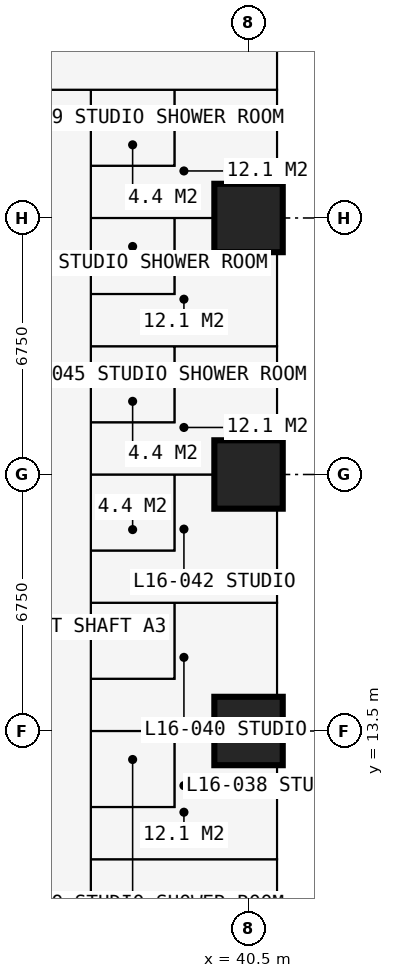
"""IFC4 building model, lengths in metres.
Left out: names, types, materials, properties, quantities, classifications, styles, units other than length and angle.
Written with IfcOpenShell. Run it as: python <this file> out.ifc"""

import sys

from ifc_helpers import new_model, si_unit, direction, frame, frame_2d, origin, origin_2d, place, context, subcontext, project, spatial, rectangle, extrude, element, fill, save


model = new_model("IFC4")
c1 = context("Model", 3, precision=1e-05, world=origin(), true_north=direction((0.0, 1.0)))
c2 = subcontext(c1, "Body", "Model", "MODEL_VIEW")
j1 = project(units=[si_unit("LENGTHUNIT", "METRE"), si_unit("PLANEANGLEUNIT", "RADIAN")], contexts=[c1])
p1 = place(None, origin())
s1 = spatial("IfcSite", under=j1, at=p1, CompositionType="ELEMENT")
p2 = place(p1, origin())
s2 = spatial("IfcBuilding", under=s1, at=p2, CompositionType="ELEMENT")
p3 = place(p2, frame((0.0, 0.0, 61.2)))
s3 = spatial("IfcBuildingStorey", under=s2, at=p3, CompositionType="ELEMENT", Elevation=61.2)
for number, where, z_axis, x_axis in (
    (1, (40.5, 13.5, 0.0), (0.0, 0.0, 1.0), (1.0, 0.0, 0.0)),
    (2, (40.5, 20.25, 0.0), (0.0, 0.0, 1.0), (1.0, 0.0, 0.0)),
    (3, (40.5, 27.0, 0.0), (0.0, 0.0, 1.0), (1.0, 0.0, 0.0)),
):
    element("IfcColumn", number, at=place(p3, frame(where, z_axis=z_axis, x_axis=x_axis)), inside=s3, PredefinedType="COLUMN", context=c2, shape_type="SweptSolid", body=[
        extrude(rectangle(XDim=1.8, YDim=1.8, at=origin_2d()), origin(), (0.0, 0.0, 1.0), 3.6),
    ])
p4 = place(p3, frame((41.25, 20.25, 0.0), z_axis=(0.0, 0.0, 1.0), x_axis=(0.0, -1.0, 0.0)))
e4 = element("IfcWall", 4, at=p4, inside=s3, PredefinedType="SOLIDWALL", context=c2, shape_type="SweptSolid", body=[
    extrude(rectangle(XDim=6.75, YDim=0.15, at=frame_2d((3.375, 0.0))), origin(), (0.0, 0.0, 1.0), 3.375),
])
p5 = place(p4, frame((0.962, 0.0, 0.0)))
e5 = element("IfcOpeningElement", 5, at=p5, cuts=e4, PredefinedType="OPENING", context=c2, shape_type="SweptSolid", body=[
    extrude(rectangle(XDim=1.0, YDim=2.2, at=frame_2d((0.5, 1.1))), frame((0.0, 0.085, 0.0), z_axis=(0.0, -1.0, 0.0), x_axis=(1.0, 0.0, 0.0)), (0.0, 0.0, 1.0), 0.17),
])
p6 = place(p4, frame((2.025, 0.0, 0.9)))
e6 = element("IfcOpeningElement", 6, at=p6, cuts=e4, PredefinedType="OPENING", context=c2, shape_type="SweptSolid", body=[
    extrude(rectangle(XDim=1.2, YDim=1.8, at=frame_2d((0.6, 0.9))), frame((0.0, 0.085, 0.0), z_axis=(0.0, -1.0, 0.0), x_axis=(1.0, 0.0, 0.0)), (0.0, 0.0, 1.0), 0.17),
])
p7 = place(p4, frame((4.788, 0.0, 0.0)))
e7 = element("IfcOpeningElement", 7, at=p7, cuts=e4, PredefinedType="OPENING", context=c2, shape_type="SweptSolid", body=[
    extrude(rectangle(XDim=1.0, YDim=2.2, at=frame_2d((0.5, 1.1))), frame((0.0, 0.085, 0.0), z_axis=(0.0, -1.0, 0.0), x_axis=(1.0, 0.0, 0.0)), (0.0, 0.0, 1.0), 0.17),
])
p8 = place(p4, frame((3.525, 0.0, 0.9)))
e8 = element("IfcOpeningElement", 8, at=p8, cuts=e4, PredefinedType="OPENING", context=c2, shape_type="SweptSolid", body=[
    extrude(rectangle(XDim=1.2, YDim=1.8, at=frame_2d((0.6, 0.9))), frame((0.0, 0.085, 0.0), z_axis=(0.0, -1.0, 0.0), x_axis=(1.0, 0.0, 0.0)), (0.0, 0.0, 1.0), 0.17),
])
p9 = place(p3, frame((41.35, 16.875, 0.0), z_axis=(0.0, 0.0, 1.0), x_axis=(1.0, 0.0, 0.0)))
e9 = element("IfcWall", 9, at=p9, inside=s3, PredefinedType="USERDEFINED", context=c2, shape_type="SweptSolid", body=[
    extrude(rectangle(XDim=2.2, YDim=1.0, at=frame_2d((1.1, 0.0))), origin(), (0.0, 0.0, 1.0), 0.9),
])
p10 = place(p3, frame((30.375, 30.375, 0.0), z_axis=(0.0, 0.0, 1.0), x_axis=(1.0, 0.0, 0.0)))
e10 = element("IfcWall", 10, at=p10, inside=s3, PredefinedType="PARTITIONING", context=c2, shape_type="SweptSolid", body=[
    extrude(rectangle(XDim=10.859, YDim=0.15, at=frame_2d((5.429, 0.0))), origin(), (0.0, 0.0, 1.0), 3.375),
])
p11 = place(p3, frame((36.35, 6.75, 0.0), z_axis=(0.0, 0.0, 1.0), x_axis=(0.0, 1.0, 0.0)))
e11 = element("IfcWall", 11, at=p11, inside=s3, PredefinedType="PARTITIONING", context=c2, shape_type="SweptSolid", body=[
    extrude(rectangle(XDim=23.625, YDim=0.1, at=frame_2d((11.812, 0.0))), origin(), (0.0, 0.0, 1.0), 3.375),
])
p12 = place(p11, frame((3.575, 0.0, 0.0)))
e12 = element("IfcOpeningElement", 12, at=p12, cuts=e11, PredefinedType="OPENING", context=c2, shape_type="SweptSolid", body=[
    extrude(rectangle(XDim=0.95, YDim=2.2, at=frame_2d((0.475, 1.1))), frame((0.0, 0.06, 0.0), z_axis=(0.0, -1.0, 0.0), x_axis=(1.0, 0.0, 0.0)), (0.0, 0.0, 1.0), 0.12),
])
p13 = place(p11, frame((7.0, 0.0, 0.0)))
e13 = element("IfcOpeningElement", 13, at=p13, cuts=e11, PredefinedType="OPENING", context=c2, shape_type="SweptSolid", body=[
    extrude(rectangle(XDim=0.95, YDim=2.2, at=frame_2d((0.475, 1.1))), frame((0.0, 0.06, 0.0), z_axis=(0.0, -1.0, 0.0), x_axis=(1.0, 0.0, 0.0)), (0.0, 0.0, 1.0), 0.12),
])
p14 = place(p11, frame((10.375, 0.0, 0.0)))
e14 = element("IfcOpeningElement", 14, at=p14, cuts=e11, PredefinedType="OPENING", context=c2, shape_type="SweptSolid", body=[
    extrude(rectangle(XDim=0.95, YDim=2.2, at=frame_2d((0.475, 1.1))), frame((0.0, 0.06, 0.0), z_axis=(0.0, -1.0, 0.0), x_axis=(1.0, 0.0, 0.0)), (0.0, 0.0, 1.0), 0.12),
])
p15 = place(p11, frame((13.75, 0.0, 0.0)))
e15 = element("IfcOpeningElement", 15, at=p15, cuts=e11, PredefinedType="OPENING", context=c2, shape_type="SweptSolid", body=[
    extrude(rectangle(XDim=0.95, YDim=2.2, at=frame_2d((0.475, 1.1))), frame((0.0, 0.06, 0.0), z_axis=(0.0, -1.0, 0.0), x_axis=(1.0, 0.0, 0.0)), (0.0, 0.0, 1.0), 0.12),
])
p16 = place(p11, frame((17.125, 0.0, 0.0)))
e16 = element("IfcOpeningElement", 16, at=p16, cuts=e11, PredefinedType="OPENING", context=c2, shape_type="SweptSolid", body=[
    extrude(rectangle(XDim=0.95, YDim=2.2, at=frame_2d((0.475, 1.1))), frame((0.0, 0.06, 0.0), z_axis=(0.0, -1.0, 0.0), x_axis=(1.0, 0.0, 0.0)), (0.0, 0.0, 1.0), 0.12),
])
p17 = place(p11, frame((20.5, 0.0, 0.0)))
e17 = element("IfcOpeningElement", 17, at=p17, cuts=e11, PredefinedType="OPENING", context=c2, shape_type="SweptSolid", body=[
    extrude(rectangle(XDim=0.95, YDim=2.2, at=frame_2d((0.475, 1.1))), frame((0.0, 0.06, 0.0), z_axis=(0.0, -1.0, 0.0), x_axis=(1.0, 0.0, 0.0)), (0.0, 0.0, 1.0), 0.12),
])
p18 = place(p3, frame((36.35, 10.125, 0.0), z_axis=(0.0, 0.0, 1.0), x_axis=(1.0, 0.0, 0.0)))
e18 = element("IfcWall", 18, at=p18, inside=s3, PredefinedType="PARTITIONING", context=c2, shape_type="SweptSolid", body=[
    extrude(rectangle(XDim=4.884, YDim=0.15, at=frame_2d((2.442, 0.0))), origin(), (0.0, 0.0, 1.0), 3.375),
])
p19 = place(p3, frame((36.35, 11.5, 0.0), z_axis=(0.0, 0.0, 1.0), x_axis=(1.0, 0.0, 0.0)))
e19 = element("IfcWall", 19, at=p19, inside=s3, PredefinedType="PARTITIONING", context=c2, shape_type="SweptSolid", body=[
    extrude(rectangle(XDim=2.2, YDim=0.1, at=frame_2d((1.1, 0.0))), origin(), (0.0, 0.0, 1.0), 3.375),
])
p20 = place(p19, frame((0.65, 0.0, 0.0)))
e20 = element("IfcOpeningElement", 20, at=p20, cuts=e19, PredefinedType="OPENING", context=c2, shape_type="SweptSolid", body=[
    extrude(rectangle(XDim=0.9, YDim=2.2, at=frame_2d((0.45, 1.1))), frame((0.0, 0.06, 0.0), z_axis=(0.0, -1.0, 0.0), x_axis=(1.0, 0.0, 0.0)), (0.0, 0.0, 1.0), 0.12),
])
p21 = place(p3, frame((36.35, 13.5, 0.0), z_axis=(0.0, 0.0, 1.0), x_axis=(1.0, 0.0, 0.0)))
e21 = element("IfcWall", 21, at=p21, inside=s3, PredefinedType="PARTITIONING", context=c2, shape_type="SweptSolid", body=[
    extrude(rectangle(XDim=4.884, YDim=0.175, at=frame_2d((2.442, 0.0))), origin(), (0.0, 0.0, 1.0), 2.877),
])
p22 = place(p3, frame((36.35, 14.875, 0.0), z_axis=(0.0, 0.0, 1.0), x_axis=(1.0, 0.0, 0.0)))
e22 = element("IfcWall", 22, at=p22, inside=s3, PredefinedType="PARTITIONING", context=c2, shape_type="SweptSolid", body=[
    extrude(rectangle(XDim=2.2, YDim=0.1, at=frame_2d((1.1, 0.0))), origin(), (0.0, 0.0, 1.0), 3.375),
])
p23 = place(p22, frame((0.65, 0.0, 0.0)))
e23 = element("IfcOpeningElement", 23, at=p23, cuts=e22, PredefinedType="OPENING", context=c2, shape_type="SweptSolid", body=[
    extrude(rectangle(XDim=0.9, YDim=2.2, at=frame_2d((0.45, 1.1))), frame((0.0, 0.06, 0.0), z_axis=(0.0, -1.0, 0.0), x_axis=(1.0, 0.0, 0.0)), (0.0, 0.0, 1.0), 0.12),
])
p24 = place(p3, frame((36.35, 16.875, 0.0), z_axis=(0.0, 0.0, 1.0), x_axis=(1.0, 0.0, 0.0)))
e24 = element("IfcWall", 24, at=p24, inside=s3, PredefinedType="PARTITIONING", context=c2, shape_type="SweptSolid", body=[
    extrude(rectangle(XDim=4.884, YDim=0.175, at=frame_2d((2.442, 0.0))), origin(), (0.0, 0.0, 1.0), 3.375),
])
p25 = place(p3, frame((36.35, 18.25, 0.0), z_axis=(0.0, 0.0, 1.0), x_axis=(1.0, 0.0, 0.0)))
e25 = element("IfcWall", 25, at=p25, inside=s3, PredefinedType="PARTITIONING", context=c2, shape_type="SweptSolid", body=[
    extrude(rectangle(XDim=2.2, YDim=0.1, at=frame_2d((1.1, 0.0))), origin(), (0.0, 0.0, 1.0), 3.375),
])
p26 = place(p25, frame((0.65, 0.0, 0.0)))
e26 = element("IfcOpeningElement", 26, at=p26, cuts=e25, PredefinedType="OPENING", context=c2, shape_type="SweptSolid", body=[
    extrude(rectangle(XDim=0.9, YDim=2.2, at=frame_2d((0.45, 1.1))), frame((0.0, 0.06, 0.0), z_axis=(0.0, -1.0, 0.0), x_axis=(1.0, 0.0, 0.0)), (0.0, 0.0, 1.0), 0.12),
])
p27 = place(p3, frame((36.35, 20.25, 0.0), z_axis=(0.0, 0.0, 1.0), x_axis=(1.0, 0.0, 0.0)))
e27 = element("IfcWall", 27, at=p27, inside=s3, PredefinedType="PARTITIONING", context=c2, shape_type="SweptSolid", body=[
    extrude(rectangle(XDim=4.884, YDim=0.175, at=frame_2d((2.442, 0.0))), origin(), (0.0, 0.0, 1.0), 2.61),
])
p28 = place(p3, frame((36.35, 21.625, 0.0), z_axis=(0.0, 0.0, 1.0), x_axis=(1.0, 0.0, 0.0)))
e28 = element("IfcWall", 28, at=p28, inside=s3, PredefinedType="PARTITIONING", context=c2, shape_type="SweptSolid", body=[
    extrude(rectangle(XDim=2.2, YDim=0.1, at=frame_2d((1.1, 0.0))), origin(), (0.0, 0.0, 1.0), 3.375),
])
p29 = place(p28, frame((0.65, 0.0, 0.0)))
e29 = element("IfcOpeningElement", 29, at=p29, cuts=e28, PredefinedType="OPENING", context=c2, shape_type="SweptSolid", body=[
    extrude(rectangle(XDim=0.9, YDim=2.2, at=frame_2d((0.45, 1.1))), frame((0.0, 0.06, 0.0), z_axis=(0.0, -1.0, 0.0), x_axis=(1.0, 0.0, 0.0)), (0.0, 0.0, 1.0), 0.12),
])
p30 = place(p3, frame((36.35, 23.625, 0.0), z_axis=(0.0, 0.0, 1.0), x_axis=(1.0, 0.0, 0.0)))
e30 = element("IfcWall", 30, at=p30, inside=s3, PredefinedType="PARTITIONING", context=c2, shape_type="SweptSolid", body=[
    extrude(rectangle(XDim=4.884, YDim=0.175, at=frame_2d((2.442, 0.0))), origin(), (0.0, 0.0, 1.0), 3.375),
])
p31 = place(p3, frame((36.35, 25.0, 0.0), z_axis=(0.0, 0.0, 1.0), x_axis=(1.0, 0.0, 0.0)))
e31 = element("IfcWall", 31, at=p31, inside=s3, PredefinedType="PARTITIONING", context=c2, shape_type="SweptSolid", body=[
    extrude(rectangle(XDim=2.2, YDim=0.1, at=frame_2d((1.1, 0.0))), origin(), (0.0, 0.0, 1.0), 3.375),
])
p32 = place(p31, frame((0.65, 0.0, 0.0)))
e32 = element("IfcOpeningElement", 32, at=p32, cuts=e31, PredefinedType="OPENING", context=c2, shape_type="SweptSolid", body=[
    extrude(rectangle(XDim=0.9, YDim=2.2, at=frame_2d((0.45, 1.1))), frame((0.0, 0.06, 0.0), z_axis=(0.0, -1.0, 0.0), x_axis=(1.0, 0.0, 0.0)), (0.0, 0.0, 1.0), 0.12),
])
p33 = place(p3, frame((36.35, 27.0, 0.0), z_axis=(0.0, 0.0, 1.0), x_axis=(1.0, 0.0, 0.0)))
e33 = element("IfcWall", 33, at=p33, inside=s3, PredefinedType="PARTITIONING", context=c2, shape_type="SweptSolid", body=[
    extrude(rectangle(XDim=4.884, YDim=0.175, at=frame_2d((2.442, 0.0))), origin(), (0.0, 0.0, 1.0), 2.61),
])
p34 = place(p3, frame((36.35, 28.375, 0.0), z_axis=(0.0, 0.0, 1.0), x_axis=(1.0, 0.0, 0.0)))
e34 = element("IfcWall", 34, at=p34, inside=s3, PredefinedType="PARTITIONING", context=c2, shape_type="SweptSolid", body=[
    extrude(rectangle(XDim=2.2, YDim=0.1, at=frame_2d((1.1, 0.0))), origin(), (0.0, 0.0, 1.0), 3.375),
])
p35 = place(p34, frame((0.65, 0.0, 0.0)))
e35 = element("IfcOpeningElement", 35, at=p35, cuts=e34, PredefinedType="OPENING", context=c2, shape_type="SweptSolid", body=[
    extrude(rectangle(XDim=0.9, YDim=2.2, at=frame_2d((0.45, 1.1))), frame((0.0, 0.06, 0.0), z_axis=(0.0, -1.0, 0.0), x_axis=(1.0, 0.0, 0.0)), (0.0, 0.0, 1.0), 0.12),
])
for number, where, z_axis, x_axis in (
    (36, (38.55, 11.5, 0.0), (0.0, 0.0, 1.0), (0.0, 1.0, 0.0)),
    (37, (38.55, 14.875, 0.0), (0.0, 0.0, 1.0), (0.0, 1.0, 0.0)),
    (38, (38.55, 18.25, 0.0), (0.0, 0.0, 1.0), (0.0, 1.0, 0.0)),
    (39, (38.55, 21.625, 0.0), (0.0, 0.0, 1.0), (0.0, 1.0, 0.0)),
    (40, (38.55, 25.0, 0.0), (0.0, 0.0, 1.0), (0.0, 1.0, 0.0)),
    (41, (38.55, 28.375, 0.0), (0.0, 0.0, 1.0), (0.0, 1.0, 0.0)),
):
    element("IfcWall", number, at=place(p3, frame(where, z_axis=z_axis, x_axis=x_axis)), inside=s3, PredefinedType="PARTITIONING", context=c2, shape_type="SweptSolid", body=[
        extrude(rectangle(XDim=2.0, YDim=0.1, at=frame_2d((1.0, 0.0))), origin(), (0.0, 0.0, 1.0), 3.375),
    ])
p36 = place(p5, origin())
e42 = element("IfcDoor", 42, at=p36, inside=s3, OperationType="SINGLE_SWING_LEFT", PredefinedType="DOOR", context=c2, shape_type="SweptSolid", body=[
    extrude(rectangle(XDim=1.0, YDim=2.2, at=frame_2d((0.5, 1.1))), frame((0.0, 0.025, 0.0), z_axis=(0.0, -1.0, 0.0), x_axis=(1.0, 0.0, 0.0)), (0.0, 0.0, 1.0), 0.05),
])
fill(e5, e42)
p37 = place(p6, origin())
e43 = element("IfcWindow", 43, at=p37, inside=s3, PartitioningType="SINGLE_PANEL", PredefinedType="WINDOW", context=c2, shape_type="SweptSolid", body=[
    extrude(rectangle(XDim=1.2, YDim=1.8, at=frame_2d((0.6, 0.9))), frame((0.0, 0.03, 0.0), z_axis=(0.0, -1.0, 0.0), x_axis=(1.0, 0.0, 0.0)), (0.0, 0.0, 1.0), 0.06),
])
fill(e6, e43)
p38 = place(p7, origin())
e44 = element("IfcDoor", 44, at=p38, inside=s3, OperationType="SINGLE_SWING_RIGHT", PredefinedType="DOOR", context=c2, shape_type="SweptSolid", body=[
    extrude(rectangle(XDim=1.0, YDim=2.2, at=frame_2d((0.5, 1.1))), frame((0.0, 0.025, 0.0), z_axis=(0.0, -1.0, 0.0), x_axis=(1.0, 0.0, 0.0)), (0.0, 0.0, 1.0), 0.05),
])
fill(e7, e44)
p39 = place(p8, origin())
e45 = element("IfcWindow", 45, at=p39, inside=s3, PartitioningType="SINGLE_PANEL", PredefinedType="WINDOW", context=c2, shape_type="SweptSolid", body=[
    extrude(rectangle(XDim=1.2, YDim=1.8, at=frame_2d((0.6, 0.9))), frame((0.0, 0.03, 0.0), z_axis=(0.0, -1.0, 0.0), x_axis=(1.0, 0.0, 0.0)), (0.0, 0.0, 1.0), 0.06),
])
fill(e8, e45)
p40 = place(p12, origin())
e46 = element("IfcDoor", 46, at=p40, inside=s3, OperationType="SINGLE_SWING_LEFT", PredefinedType="DOOR", context=c2, shape_type="SweptSolid", body=[
    extrude(rectangle(XDim=0.95, YDim=2.2, at=frame_2d((0.475, 1.1))), frame((0.0, 0.025, 0.0), z_axis=(0.0, -1.0, 0.0), x_axis=(1.0, 0.0, 0.0)), (0.0, 0.0, 1.0), 0.05),
])
fill(e12, e46)
p41 = place(p20, origin())
e47 = element("IfcDoor", 47, at=p41, inside=s3, OperationType="SINGLE_SWING_RIGHT", PredefinedType="DOOR", context=c2, shape_type="SweptSolid", body=[
    extrude(rectangle(XDim=0.9, YDim=2.2, at=frame_2d((0.45, 1.1))), frame((0.0, 0.025, 0.0), z_axis=(0.0, -1.0, 0.0), x_axis=(1.0, 0.0, 0.0)), (0.0, 0.0, 1.0), 0.05),
])
fill(e20, e47)
p42 = place(p13, origin())
e48 = element("IfcDoor", 48, at=p42, inside=s3, OperationType="SINGLE_SWING_LEFT", PredefinedType="DOOR", context=c2, shape_type="SweptSolid", body=[
    extrude(rectangle(XDim=0.95, YDim=2.2, at=frame_2d((0.475, 1.1))), frame((0.0, 0.025, 0.0), z_axis=(0.0, -1.0, 0.0), x_axis=(1.0, 0.0, 0.0)), (0.0, 0.0, 1.0), 0.05),
])
fill(e13, e48)
p43 = place(p23, origin())
e49 = element("IfcDoor", 49, at=p43, inside=s3, OperationType="SINGLE_SWING_RIGHT", PredefinedType="DOOR", context=c2, shape_type="SweptSolid", body=[
    extrude(rectangle(XDim=0.9, YDim=2.2, at=frame_2d((0.45, 1.1))), frame((0.0, 0.025, 0.0), z_axis=(0.0, -1.0, 0.0), x_axis=(1.0, 0.0, 0.0)), (0.0, 0.0, 1.0), 0.05),
])
fill(e23, e49)
p44 = place(p14, origin())
e50 = element("IfcDoor", 50, at=p44, inside=s3, OperationType="SINGLE_SWING_LEFT", PredefinedType="DOOR", context=c2, shape_type="SweptSolid", body=[
    extrude(rectangle(XDim=0.95, YDim=2.2, at=frame_2d((0.475, 1.1))), frame((0.0, 0.025, 0.0), z_axis=(0.0, -1.0, 0.0), x_axis=(1.0, 0.0, 0.0)), (0.0, 0.0, 1.0), 0.05),
])
fill(e14, e50)
p45 = place(p26, origin())
e51 = element("IfcDoor", 51, at=p45, inside=s3, OperationType="SINGLE_SWING_RIGHT", PredefinedType="DOOR", context=c2, shape_type="SweptSolid", body=[
    extrude(rectangle(XDim=0.9, YDim=2.2, at=frame_2d((0.45, 1.1))), frame((0.0, 0.025, 0.0), z_axis=(0.0, -1.0, 0.0), x_axis=(1.0, 0.0, 0.0)), (0.0, 0.0, 1.0), 0.05),
])
fill(e26, e51)
p46 = place(p15, origin())
e52 = element("IfcDoor", 52, at=p46, inside=s3, OperationType="SINGLE_SWING_LEFT", PredefinedType="DOOR", context=c2, shape_type="SweptSolid", body=[
    extrude(rectangle(XDim=0.95, YDim=2.2, at=frame_2d((0.475, 1.1))), frame((0.0, 0.025, 0.0), z_axis=(0.0, -1.0, 0.0), x_axis=(1.0, 0.0, 0.0)), (0.0, 0.0, 1.0), 0.05),
])
fill(e15, e52)
p47 = place(p29, origin())
e53 = element("IfcDoor", 53, at=p47, inside=s3, OperationType="SINGLE_SWING_RIGHT", PredefinedType="DOOR", context=c2, shape_type="SweptSolid", body=[
    extrude(rectangle(XDim=0.9, YDim=2.2, at=frame_2d((0.45, 1.1))), frame((0.0, 0.025, 0.0), z_axis=(0.0, -1.0, 0.0), x_axis=(1.0, 0.0, 0.0)), (0.0, 0.0, 1.0), 0.05),
])
fill(e29, e53)
p48 = place(p16, origin())
e54 = element("IfcDoor", 54, at=p48, inside=s3, OperationType="SINGLE_SWING_LEFT", PredefinedType="DOOR", context=c2, shape_type="SweptSolid", body=[
    extrude(rectangle(XDim=0.95, YDim=2.2, at=frame_2d((0.475, 1.1))), frame((0.0, 0.025, 0.0), z_axis=(0.0, -1.0, 0.0), x_axis=(1.0, 0.0, 0.0)), (0.0, 0.0, 1.0), 0.05),
])
fill(e16, e54)
p49 = place(p32, origin())
e55 = element("IfcDoor", 55, at=p49, inside=s3, OperationType="SINGLE_SWING_RIGHT", PredefinedType="DOOR", context=c2, shape_type="SweptSolid", body=[
    extrude(rectangle(XDim=0.9, YDim=2.2, at=frame_2d((0.45, 1.1))), frame((0.0, 0.025, 0.0), z_axis=(0.0, -1.0, 0.0), x_axis=(1.0, 0.0, 0.0)), (0.0, 0.0, 1.0), 0.05),
])
fill(e32, e55)
p50 = place(p17, origin())
e56 = element("IfcDoor", 56, at=p50, inside=s3, OperationType="SINGLE_SWING_LEFT", PredefinedType="DOOR", context=c2, shape_type="SweptSolid", body=[
    extrude(rectangle(XDim=0.95, YDim=2.2, at=frame_2d((0.475, 1.1))), frame((0.0, 0.025, 0.0), z_axis=(0.0, -1.0, 0.0), x_axis=(1.0, 0.0, 0.0)), (0.0, 0.0, 1.0), 0.05),
])
fill(e17, e56)
p51 = place(p35, origin())
e57 = element("IfcDoor", 57, at=p51, inside=s3, OperationType="SINGLE_SWING_RIGHT", PredefinedType="DOOR", context=c2, shape_type="SweptSolid", body=[
    extrude(rectangle(XDim=0.9, YDim=2.2, at=frame_2d((0.45, 1.1))), frame((0.0, 0.025, 0.0), z_axis=(0.0, -1.0, 0.0), x_axis=(1.0, 0.0, 0.0)), (0.0, 0.0, 1.0), 0.05),
])
fill(e35, e57)
save(model, sys.argv[1])
